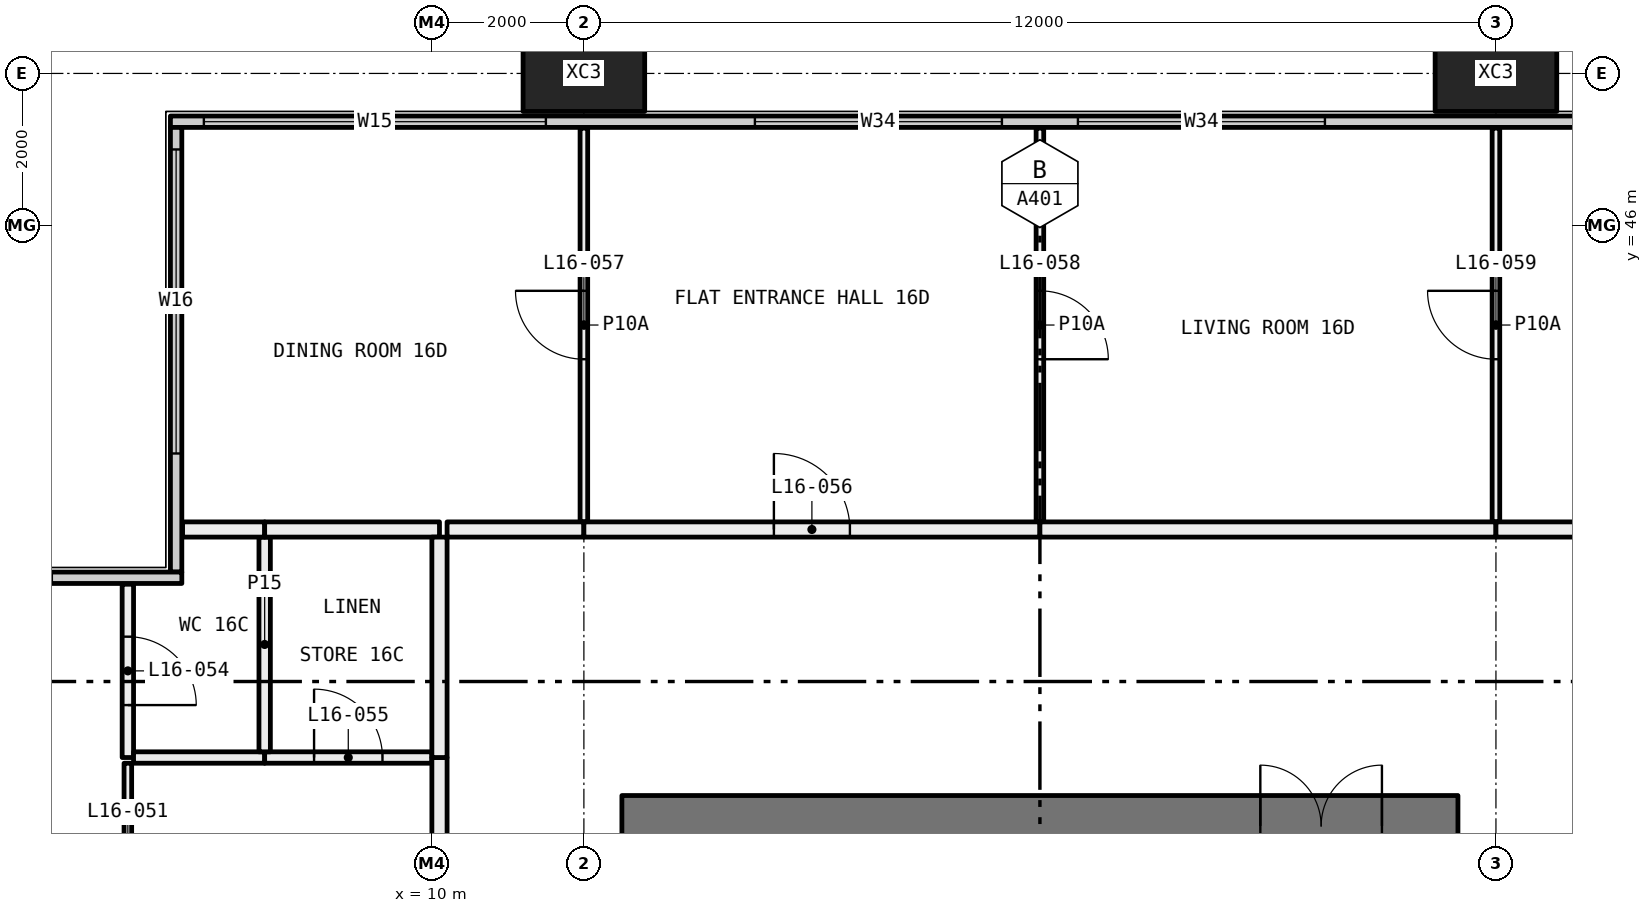
"""IFC4 building model, lengths in metres.
Left out: names, types, materials, properties, quantities, classifications, styles, units other than length and angle.
Written with IfcOpenShell. Run it as: python <this file> out.ifc"""

import sys

from ifc_helpers import new_model, si_unit, direction, frame, frame_2d, origin, origin_2d, place, context, subcontext, project, spatial, rectangle, hollow_rectangle, extrude, element, fill, save


model = new_model("IFC4")
c1 = context("Model", 3, precision=1e-05, world=origin(), true_north=direction((0.0, 1.0)))
c2 = subcontext(c1, "Body", "Model", "MODEL_VIEW")
j1 = project(units=[si_unit("LENGTHUNIT", "METRE"), si_unit("PLANEANGLEUNIT", "RADIAN")], contexts=[c1])
p1 = place(None, origin())
s1 = spatial("IfcSite", under=j1, at=p1, CompositionType="ELEMENT")
p2 = place(p1, origin())
s2 = spatial("IfcBuilding", under=s1, at=p2, CompositionType="ELEMENT")
p3 = place(p2, frame((0.0, 0.0, 67.95)))
s3 = spatial("IfcBuildingStorey", under=s2, at=p3, CompositionType="ELEMENT", Elevation=67.95)
for number, where, z_axis, x_axis in (
    (1, (12.0, 48.0, -0.4), (0.0, 0.0, 1.0), (1.0, 0.0, 0.0)),
    (2, (24.0, 48.0, -0.4), (0.0, 0.0, 1.0), (1.0, 0.0, 0.0)),
):
    element("IfcColumn", number, at=place(p3, frame(where, z_axis=z_axis, x_axis=x_axis)), inside=s3, PredefinedType="COLUMN", context=c2, shape_type="SweptSolid", body=[
        extrude(hollow_rectangle(XDim=1.6, YDim=1.0, WallThickness=0.065, at=origin_2d()), origin(), (0.0, 0.0, 1.0), 3.45),
    ])
p4 = place(p3, frame((6.56, 47.365, 0.0), z_axis=(0.0, 0.0, 1.0), x_axis=(1.0, 0.0, 0.0)))
e3 = element("IfcWall", 3, at=p4, inside=s3, PredefinedType="ELEMENTEDWALL", context=c2, shape_type="SweptSolid", body=[
    extrude(rectangle(XDim=58.88, YDim=0.15, at=frame_2d((29.44, 0.0))), origin(), (0.0, 0.0, 1.0), 3.05),
])
p5 = place(p4, frame((0.44, 0.0, 0.45)))
e4 = element("IfcOpeningElement", 4, at=p5, cuts=e3, PredefinedType="OPENING", context=c2, shape_type="SweptSolid", body=[
    extrude(rectangle(XDim=4.5, YDim=2.55, at=frame_2d((2.25, 1.275))), frame((0.0, 0.085, 0.0), z_axis=(0.0, -1.0, 0.0), x_axis=(1.0, 0.0, 0.0)), (0.0, 0.0, 1.0), 0.17),
])
p6 = place(p4, frame((7.69, 0.0, 0.45)))
e5 = element("IfcOpeningElement", 5, at=p6, cuts=e3, PredefinedType="OPENING", context=c2, shape_type="SweptSolid", body=[
    extrude(rectangle(XDim=3.25, YDim=2.55, at=frame_2d((1.625, 1.275))), frame((0.0, 0.085, 0.0), z_axis=(0.0, -1.0, 0.0), x_axis=(1.0, 0.0, 0.0)), (0.0, 0.0, 1.0), 0.17),
])
p7 = place(p4, frame((11.94, 0.0, 0.45)))
e6 = element("IfcOpeningElement", 6, at=p7, cuts=e3, PredefinedType="OPENING", context=c2, shape_type="SweptSolid", body=[
    extrude(rectangle(XDim=3.25, YDim=2.55, at=frame_2d((1.625, 1.275))), frame((0.0, 0.085, 0.0), z_axis=(0.0, -1.0, 0.0), x_axis=(1.0, 0.0, 0.0)), (0.0, 0.0, 1.0), 0.17),
])
p8 = place(p4, frame((19.69, 0.0, 0.45)))
e7 = element("IfcOpeningElement", 7, at=p8, cuts=e3, PredefinedType="OPENING", context=c2, shape_type="SweptSolid", body=[
    extrude(rectangle(XDim=3.25, YDim=2.55, at=frame_2d((1.625, 1.275))), frame((0.0, 0.085, 0.0), z_axis=(0.0, -1.0, 0.0), x_axis=(1.0, 0.0, 0.0)), (0.0, 0.0, 1.0), 0.17),
])
p9 = place(p4, frame((23.94, 0.0, 0.45)))
e8 = element("IfcOpeningElement", 8, at=p9, cuts=e3, PredefinedType="OPENING", context=c2, shape_type="SweptSolid", body=[
    extrude(rectangle(XDim=2.0, YDim=2.55, at=frame_2d((1.0, 1.275))), frame((0.0, 0.085, 0.0), z_axis=(0.0, -1.0, 0.0), x_axis=(1.0, 0.0, 0.0)), (0.0, 0.0, 1.0), 0.17),
])
p10 = place(p4, frame((31.69, 0.0, 0.45)))
e9 = element("IfcOpeningElement", 9, at=p10, cuts=e3, PredefinedType="OPENING", context=c2, shape_type="SweptSolid", body=[
    extrude(rectangle(XDim=3.25, YDim=2.55, at=frame_2d((1.625, 1.275))), frame((0.0, 0.085, 0.0), z_axis=(0.0, -1.0, 0.0), x_axis=(1.0, 0.0, 0.0)), (0.0, 0.0, 1.0), 0.17),
])
p11 = place(p4, frame((35.94, 0.0, 0.45)))
e10 = element("IfcOpeningElement", 10, at=p11, cuts=e3, PredefinedType="OPENING", context=c2, shape_type="SweptSolid", body=[
    extrude(rectangle(XDim=3.25, YDim=2.55, at=frame_2d((1.625, 1.275))), frame((0.0, 0.085, 0.0), z_axis=(0.0, -1.0, 0.0), x_axis=(1.0, 0.0, 0.0)), (0.0, 0.0, 1.0), 0.17),
])
p12 = place(p4, frame((43.69, 0.0, 0.45)))
e11 = element("IfcOpeningElement", 11, at=p12, cuts=e3, PredefinedType="OPENING", context=c2, shape_type="SweptSolid", body=[
    extrude(rectangle(XDim=3.25, YDim=2.55, at=frame_2d((1.625, 1.275))), frame((0.0, 0.085, 0.0), z_axis=(0.0, -1.0, 0.0), x_axis=(1.0, 0.0, 0.0)), (0.0, 0.0, 1.0), 0.17),
])
p13 = place(p4, frame((47.94, 0.0, 0.45)))
e12 = element("IfcOpeningElement", 12, at=p13, cuts=e3, PredefinedType="OPENING", context=c2, shape_type="SweptSolid", body=[
    extrude(rectangle(XDim=2.0, YDim=2.55, at=frame_2d((1.0, 1.275))), frame((0.0, 0.085, 0.0), z_axis=(0.0, -1.0, 0.0), x_axis=(1.0, 0.0, 0.0)), (0.0, 0.0, 1.0), 0.17),
])
p14 = place(p4, frame((53.94, 0.0, 0.45)))
e13 = element("IfcOpeningElement", 13, at=p14, cuts=e3, PredefinedType="OPENING", context=c2, shape_type="SweptSolid", body=[
    extrude(rectangle(XDim=4.5, YDim=2.55, at=frame_2d((2.25, 1.275))), frame((0.0, 0.085, 0.0), z_axis=(0.0, -1.0, 0.0), x_axis=(1.0, 0.0, 0.0)), (0.0, 0.0, 1.0), 0.17),
])
p15 = place(p3, frame((6.635, 41.44, 0.0), z_axis=(0.0, 0.0, 1.0), x_axis=(0.0, 1.0, 0.0)))
e14 = element("IfcWall", 14, at=p15, inside=s3, PredefinedType="ELEMENTEDWALL", context=c2, shape_type="SweptSolid", body=[
    extrude(rectangle(XDim=5.85, YDim=0.15, at=frame_2d((2.925, 0.0))), origin(), (0.0, 0.0, 1.0), 3.05),
])
p16 = place(p15, frame((1.56, 0.0, 0.45)))
e15 = element("IfcOpeningElement", 15, at=p16, cuts=e14, PredefinedType="OPENING", context=c2, shape_type="SweptSolid", body=[
    extrude(rectangle(XDim=4.0, YDim=2.55, at=frame_2d((2.0, 1.275))), frame((0.0, 0.085, 0.0), z_axis=(0.0, -1.0, 0.0), x_axis=(1.0, 0.0, 0.0)), (0.0, 0.0, 1.0), 0.17),
])
p17 = place(p3, frame((0.56, 41.365, 0.0), z_axis=(0.0, 0.0, 1.0), x_axis=(1.0, 0.0, 0.0)))
e16 = element("IfcWall", 16, at=p17, inside=s3, PredefinedType="ELEMENTEDWALL", context=c2, shape_type="SweptSolid", body=[
    extrude(rectangle(XDim=6.15, YDim=0.15, at=frame_2d((3.075, 0.0))), origin(), (0.0, 0.0, 1.0), 3.05),
])
p18 = place(p17, frame((0.44, 0.0, 0.45)))
e17 = element("IfcOpeningElement", 17, at=p18, cuts=e16, PredefinedType="OPENING", context=c2, shape_type="SweptSolid", body=[
    extrude(rectangle(XDim=4.0, YDim=2.55, at=frame_2d((2.0, 1.275))), frame((0.0, 0.085, 0.0), z_axis=(0.0, -1.0, 0.0), x_axis=(1.0, 0.0, 0.0)), (0.0, 0.0, 1.0), 0.17),
])
p19 = place(p3, frame((6.0, 36.05, 0.0), z_axis=(0.0, 0.0, 1.0), x_axis=(0.0, 1.0, 0.0)))
e18 = element("IfcWall", 18, at=p19, inside=s3, PredefinedType="PARTITIONING", context=c2, shape_type="SweptSolid", body=[
    extrude(rectangle(XDim=2.875, YDim=0.1, at=frame_2d((1.438, 0.0))), origin(), (0.0, 0.0, 1.0), 2.45),
])
p20 = place(p19, frame((0.988, 0.0, 0.0)))
e19 = element("IfcOpeningElement", 19, at=p20, cuts=e18, PredefinedType="OPENING", context=c2, shape_type="SweptSolid", body=[
    extrude(rectangle(XDim=0.9, YDim=2.1, at=frame_2d((0.45, 1.05))), frame((0.0, 0.06, 0.0), z_axis=(0.0, -1.0, 0.0), x_axis=(1.0, 0.0, 0.0)), (0.0, 0.0, 1.0), 0.12),
])
p21 = place(p3, frame((6.0, 39.0, 0.0), z_axis=(0.0, 0.0, 1.0), x_axis=(0.0, 1.0, 0.0)))
e20 = element("IfcWall", 20, at=p21, inside=s3, PredefinedType="PARTITIONING", context=c2, shape_type="SweptSolid", body=[
    extrude(rectangle(XDim=2.28, YDim=0.15, at=frame_2d((1.14, 0.0))), origin(), (0.0, 0.0, 1.0), 3.05),
])
p22 = place(p21, frame((0.69, 0.0, 0.0)))
e21 = element("IfcOpeningElement", 21, at=p22, cuts=e20, PredefinedType="OPENING", context=c2, shape_type="SweptSolid", body=[
    extrude(rectangle(XDim=0.9, YDim=2.1, at=frame_2d((0.45, 1.05))), frame((0.0, 0.085, 0.0), z_axis=(0.0, -1.0, 0.0), x_axis=(1.0, 0.0, 0.0)), (0.0, 0.0, 1.0), 0.17),
])
p23 = place(p3, frame((7.8, 39.0, 0.0), z_axis=(0.0, 0.0, 1.0), x_axis=(-1.0, 0.0, 0.0)))
e22 = element("IfcWall", 22, at=p23, inside=s3, PredefinedType="PARTITIONING", context=c2, shape_type="SweptSolid", body=[
    extrude(rectangle(XDim=1.725, YDim=0.15, at=frame_2d((0.863, 0.0))), origin(), (0.0, 0.0, 1.0), 3.05),
])
p24 = place(p3, frame((10.0, 39.0, 0.0), z_axis=(0.0, 0.0, 1.0), x_axis=(-1.0, 0.0, 0.0)))
e23 = element("IfcWall", 23, at=p24, inside=s3, PredefinedType="PARTITIONING", context=c2, shape_type="SweptSolid", body=[
    extrude(rectangle(XDim=2.2, YDim=0.15, at=frame_2d((1.1, 0.0))), origin(), (0.0, 0.0, 1.0), 3.05),
])
p25 = place(p24, frame((0.65, 0.0, 0.0)))
e24 = element("IfcOpeningElement", 24, at=p25, cuts=e23, PredefinedType="OPENING", context=c2, shape_type="SweptSolid", body=[
    extrude(rectangle(XDim=0.9, YDim=2.1, at=frame_2d((0.45, 1.05))), frame((0.0, 0.085, 0.0), z_axis=(0.0, -1.0, 0.0), x_axis=(1.0, 0.0, 0.0)), (0.0, 0.0, 1.0), 0.17),
])
p26 = place(p3, frame((10.1, 36.1, 0.0), z_axis=(0.0, 0.0, 1.0), x_axis=(0.0, 1.0, 0.0)))
e25 = element("IfcWall", 25, at=p26, inside=s3, PredefinedType="PARTITIONING", context=c2, shape_type="SweptSolid", body=[
    extrude(rectangle(XDim=2.9, YDim=0.2, at=frame_2d((1.45, 0.0))), origin(), (0.0, 0.0, 1.0), 3.05),
])
p27 = place(p3, frame((7.8, 39.075, 0.0), z_axis=(0.0, 0.0, 1.0), x_axis=(0.0, 1.0, 0.0)))
e26 = element("IfcWall", 26, at=p27, inside=s3, PredefinedType="PARTITIONING", context=c2, shape_type="SweptSolid", body=[
    extrude(rectangle(XDim=2.825, YDim=0.15, at=frame_2d((1.413, 0.0))), origin(), (0.0, 0.0, 1.0), 3.05),
])
p28 = place(p3, frame((7.8, 42.0, 0.0), z_axis=(0.0, 0.0, 1.0), x_axis=(-1.0, 0.0, 0.0)))
e27 = element("IfcWall", 27, at=p28, inside=s3, PredefinedType="PARTITIONING", context=c2, shape_type="SweptSolid", body=[
    extrude(rectangle(XDim=1.08, YDim=0.2, at=frame_2d((0.54, 0.0))), origin(), (0.0, 0.0, 1.0), 3.05),
])
p29 = place(p3, frame((10.1, 42.0, 0.0), z_axis=(0.0, 0.0, 1.0), x_axis=(-1.0, 0.0, 0.0)))
e28 = element("IfcWall", 28, at=p29, inside=s3, PredefinedType="PARTITIONING", context=c2, shape_type="SweptSolid", body=[
    extrude(rectangle(XDim=2.3, YDim=0.2, at=frame_2d((1.15, 0.0))), origin(), (0.0, 0.0, 1.0), 3.05),
])
p30 = place(p3, frame((10.1, 39.0, 0.0), z_axis=(0.0, 0.0, 1.0), x_axis=(0.0, 1.0, 0.0)))
e29 = element("IfcWall", 29, at=p30, inside=s3, PredefinedType="PARTITIONING", context=c2, shape_type="SweptSolid", body=[
    extrude(rectangle(XDim=2.9, YDim=0.2, at=frame_2d((1.45, 0.0))), origin(), (0.0, 0.0, 1.0), 3.05),
])
p31 = place(p3, frame((12.0, 42.1, 0.0), z_axis=(0.0, 0.0, 1.0), x_axis=(0.0, 1.0, 0.0)))
e30 = element("IfcWall", 30, at=p31, inside=s3, PredefinedType="PARTITIONING", context=c2, shape_type="SweptSolid", body=[
    extrude(rectangle(XDim=5.18, YDim=0.1, at=frame_2d((2.59, 0.0))), origin(), (0.0, 0.0, 1.0), 3.05),
])
p32 = place(p31, frame((2.14, 0.0, 0.0)))
e31 = element("IfcOpeningElement", 31, at=p32, cuts=e30, PredefinedType="OPENING", context=c2, shape_type="SweptSolid", body=[
    extrude(rectangle(XDim=0.9, YDim=2.1, at=frame_2d((0.45, 1.05))), frame((0.0, 0.06, 0.0), z_axis=(0.0, -1.0, 0.0), x_axis=(1.0, 0.0, 0.0)), (0.0, 0.0, 1.0), 0.12),
])
p33 = place(p3, frame((10.2, 42.0, 0.0), z_axis=(0.0, 0.0, 1.0), x_axis=(1.0, 0.0, 0.0)))
e32 = element("IfcWall", 32, at=p33, inside=s3, PredefinedType="PARTITIONING", context=c2, shape_type="SweptSolid", body=[
    extrude(rectangle(XDim=1.8, YDim=0.2, at=frame_2d((0.9, 0.0))), origin(), (0.0, 0.0, 1.0), 3.05),
])
p34 = place(p3, frame((18.0, 42.1, 0.0), z_axis=(0.0, 0.0, 1.0), x_axis=(0.0, 1.0, 0.0)))
e33 = element("IfcWall", 33, at=p34, inside=s3, PredefinedType="PARTITIONING", context=c2, shape_type="SweptSolid", body=[
    extrude(rectangle(XDim=5.18, YDim=0.1, at=frame_2d((2.59, 0.0))), origin(), (0.0, 0.0, 1.0), 3.05),
])
p35 = place(p34, frame((2.14, 0.0, 0.0)))
e34 = element("IfcOpeningElement", 34, at=p35, cuts=e33, PredefinedType="OPENING", context=c2, shape_type="SweptSolid", body=[
    extrude(rectangle(XDim=0.9, YDim=2.1, at=frame_2d((0.45, 1.05))), frame((0.0, 0.06, 0.0), z_axis=(0.0, -1.0, 0.0), x_axis=(1.0, 0.0, 0.0)), (0.0, 0.0, 1.0), 0.12),
])
p36 = place(p3, frame((12.0, 42.0, 0.0), z_axis=(0.0, 0.0, 1.0), x_axis=(1.0, 0.0, 0.0)))
e35 = element("IfcWall", 35, at=p36, inside=s3, PredefinedType="PARTITIONING", context=c2, shape_type="SweptSolid", body=[
    extrude(rectangle(XDim=6.0, YDim=0.2, at=frame_2d((3.0, 0.0))), origin(), (0.0, 0.0, 1.0), 3.05),
])
p37 = place(p36, frame((2.5, 0.0, 0.0)))
e36 = element("IfcOpeningElement", 36, at=p37, cuts=e35, PredefinedType="OPENING", context=c2, shape_type="SweptSolid", body=[
    extrude(rectangle(XDim=1.0, YDim=2.1, at=frame_2d((0.5, 1.05))), frame((0.0, 0.11, 0.0), z_axis=(0.0, -1.0, 0.0), x_axis=(1.0, 0.0, 0.0)), (0.0, 0.0, 1.0), 0.22),
])
p38 = place(p3, frame((24.0, 42.1, 0.0), z_axis=(0.0, 0.0, 1.0), x_axis=(0.0, 1.0, 0.0)))
e37 = element("IfcWall", 37, at=p38, inside=s3, PredefinedType="PARTITIONING", context=c2, shape_type="SweptSolid", body=[
    extrude(rectangle(XDim=5.18, YDim=0.1, at=frame_2d((2.59, 0.0))), origin(), (0.0, 0.0, 1.0), 3.05),
])
p39 = place(p38, frame((2.14, 0.0, 0.0)))
e38 = element("IfcOpeningElement", 38, at=p39, cuts=e37, PredefinedType="OPENING", context=c2, shape_type="SweptSolid", body=[
    extrude(rectangle(XDim=0.9, YDim=2.1, at=frame_2d((0.45, 1.05))), frame((0.0, 0.06, 0.0), z_axis=(0.0, -1.0, 0.0), x_axis=(1.0, 0.0, 0.0)), (0.0, 0.0, 1.0), 0.12),
])
p40 = place(p3, frame((18.0, 42.0, 0.0), z_axis=(0.0, 0.0, 1.0), x_axis=(1.0, 0.0, 0.0)))
e39 = element("IfcWall", 39, at=p40, inside=s3, PredefinedType="PARTITIONING", context=c2, shape_type="SweptSolid", body=[
    extrude(rectangle(XDim=6.0, YDim=0.2, at=frame_2d((3.0, 0.0))), origin(), (0.0, 0.0, 1.0), 3.05),
])
p41 = place(p3, frame((24.0, 42.0, 0.0), z_axis=(0.0, 0.0, 1.0), x_axis=(1.0, 0.0, 0.0)))
e40 = element("IfcWall", 40, at=p41, inside=s3, PredefinedType="PARTITIONING", context=c2, shape_type="SweptSolid", body=[
    extrude(rectangle(XDim=1.9, YDim=0.2, at=frame_2d((0.95, 0.0))), origin(), (0.0, 0.0, 1.0), 3.05),
])
p42 = place(p3, frame((12.5, 38.1, 0.0), z_axis=(0.0, 0.0, 1.0), x_axis=(1.0, 0.0, 0.0)))
e41 = element("IfcWall", 41, at=p42, inside=s3, PredefinedType="SHEAR", context=c2, shape_type="SweptSolid", body=[
    extrude(rectangle(XDim=11.0, YDim=0.8, at=frame_2d((5.5, 0.0))), origin(), (0.0, 0.0, 1.0), 3.05),
])
p43 = place(p42, frame((8.4, 0.0, 0.0)))
e42 = element("IfcOpeningElement", 42, at=p43, cuts=e41, PredefinedType="OPENING", context=c2, shape_type="SweptSolid", body=[
    extrude(rectangle(XDim=1.6, YDim=2.1, at=frame_2d((0.8, 1.05))), frame((0.0, 0.41, 0.0), z_axis=(0.0, -1.0, 0.0), x_axis=(1.0, 0.0, 0.0)), (0.0, 0.0, 1.0), 0.82),
])
p44 = place(p5, origin())
e43 = element("IfcWindow", 43, at=p44, inside=s3, PartitioningType="SINGLE_PANEL", PredefinedType="WINDOW", context=c2, shape_type="SweptSolid", body=[
    extrude(rectangle(XDim=4.5, YDim=2.55, at=frame_2d((2.25, 1.275))), frame((0.0, 0.03, 0.0), z_axis=(0.0, -1.0, 0.0), x_axis=(1.0, 0.0, 0.0)), (0.0, 0.0, 1.0), 0.06),
])
fill(e4, e43)
p45 = place(p6, origin())
e44 = element("IfcWindow", 44, at=p45, inside=s3, PartitioningType="SINGLE_PANEL", PredefinedType="WINDOW", context=c2, shape_type="SweptSolid", body=[
    extrude(rectangle(XDim=3.25, YDim=2.55, at=frame_2d((1.625, 1.275))), frame((0.0, 0.03, 0.0), z_axis=(0.0, -1.0, 0.0), x_axis=(1.0, 0.0, 0.0)), (0.0, 0.0, 1.0), 0.06),
])
fill(e5, e44)
p46 = place(p7, origin())
e45 = element("IfcWindow", 45, at=p46, inside=s3, PartitioningType="SINGLE_PANEL", PredefinedType="WINDOW", context=c2, shape_type="SweptSolid", body=[
    extrude(rectangle(XDim=3.25, YDim=2.55, at=frame_2d((1.625, 1.275))), frame((0.0, 0.03, 0.0), z_axis=(0.0, -1.0, 0.0), x_axis=(1.0, 0.0, 0.0)), (0.0, 0.0, 1.0), 0.06),
])
fill(e6, e45)
p47 = place(p16, origin())
e46 = element("IfcWindow", 46, at=p47, inside=s3, PartitioningType="SINGLE_PANEL", PredefinedType="WINDOW", context=c2, shape_type="SweptSolid", body=[
    extrude(rectangle(XDim=4.0, YDim=2.55, at=frame_2d((2.0, 1.275))), frame((0.0, 0.03, 0.0), z_axis=(0.0, -1.0, 0.0), x_axis=(1.0, 0.0, 0.0)), (0.0, 0.0, 1.0), 0.06),
])
fill(e15, e46)
p48 = place(p22, frame((0.9, 0.0, 0.0), x_axis=(-1.0, 0.0, 0.0)))
e47 = element("IfcDoor", 47, at=p48, inside=s3, OperationType="SINGLE_SWING_LEFT", PredefinedType="DOOR", context=c2, shape_type="SweptSolid", body=[
    extrude(rectangle(XDim=0.9, YDim=2.1, at=frame_2d((0.45, 1.05))), frame((0.0, 0.025, 0.0), z_axis=(0.0, -1.0, 0.0), x_axis=(1.0, 0.0, 0.0)), (0.0, 0.0, 1.0), 0.05),
])
fill(e21, e47)
p49 = place(p25, frame((0.9, 0.0, 0.0), x_axis=(-1.0, 0.0, 0.0)))
e48 = element("IfcDoor", 48, at=p49, inside=s3, OperationType="SINGLE_SWING_RIGHT", PredefinedType="DOOR", context=c2, shape_type="SweptSolid", body=[
    extrude(rectangle(XDim=0.9, YDim=2.1, at=frame_2d((0.45, 1.05))), frame((0.0, 0.025, 0.0), z_axis=(0.0, -1.0, 0.0), x_axis=(1.0, 0.0, 0.0)), (0.0, 0.0, 1.0), 0.05),
])
fill(e24, e48)
p50 = place(p37, origin())
e49 = element("IfcDoor", 49, at=p50, inside=s3, OperationType="SINGLE_SWING_RIGHT", PredefinedType="DOOR", context=c2, shape_type="SweptSolid", body=[
    extrude(rectangle(XDim=1.0, YDim=2.1, at=frame_2d((0.5, 1.05))), frame((0.0, 0.025, 0.0), z_axis=(0.0, -1.0, 0.0), x_axis=(1.0, 0.0, 0.0)), (0.0, 0.0, 1.0), 0.05),
])
fill(e36, e49)
p51 = place(p32, origin())
e50 = element("IfcDoor", 50, at=p51, inside=s3, OperationType="SINGLE_SWING_LEFT", PredefinedType="DOOR", context=c2, shape_type="SweptSolid", body=[
    extrude(rectangle(XDim=0.9, YDim=2.1, at=frame_2d((0.45, 1.05))), frame((0.0, 0.025, 0.0), z_axis=(0.0, -1.0, 0.0), x_axis=(1.0, 0.0, 0.0)), (0.0, 0.0, 1.0), 0.05),
])
fill(e31, e50)
p52 = place(p35, frame((0.9, 0.0, 0.0), x_axis=(-1.0, 0.0, 0.0)))
e51 = element("IfcDoor", 51, at=p52, inside=s3, OperationType="SINGLE_SWING_LEFT", PredefinedType="DOOR", context=c2, shape_type="SweptSolid", body=[
    extrude(rectangle(XDim=0.9, YDim=2.1, at=frame_2d((0.45, 1.05))), frame((0.0, 0.025, 0.0), z_axis=(0.0, -1.0, 0.0), x_axis=(1.0, 0.0, 0.0)), (0.0, 0.0, 1.0), 0.05),
])
fill(e34, e51)
p53 = place(p39, origin())
e52 = element("IfcDoor", 52, at=p53, inside=s3, OperationType="SINGLE_SWING_LEFT", PredefinedType="DOOR", context=c2, shape_type="SweptSolid", body=[
    extrude(rectangle(XDim=0.9, YDim=2.1, at=frame_2d((0.45, 1.05))), frame((0.0, 0.025, 0.0), z_axis=(0.0, -1.0, 0.0), x_axis=(1.0, 0.0, 0.0)), (0.0, 0.0, 1.0), 0.05),
])
fill(e38, e52)
p54 = place(p43, origin())
e53 = element("IfcDoor", 53, at=p54, inside=s3, OperationType="DOUBLE_DOOR_SINGLE_SWING", PredefinedType="DOOR", context=c2, shape_type="SweptSolid", body=[
    extrude(rectangle(XDim=1.6, YDim=2.1, at=frame_2d((0.8, 1.05))), frame((0.0, 0.025, 0.0), z_axis=(0.0, -1.0, 0.0), x_axis=(1.0, 0.0, 0.0)), (0.0, 0.0, 1.0), 0.05),
])
fill(e42, e53)
save(model, sys.argv[1])
